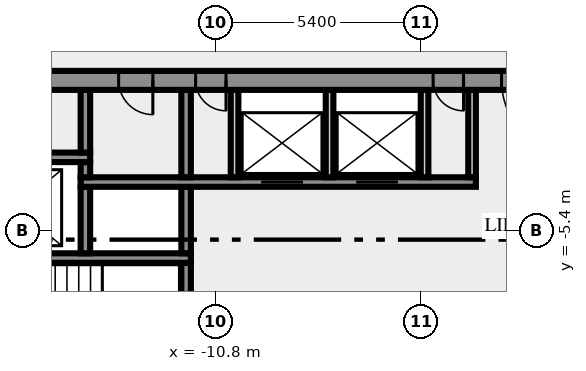
"""IFC4 building model, lengths in metres.
Left out: names, types, materials, properties, quantities, classifications, styles, units other than length and angle.
Written with IfcOpenShell. Run it as: python <this file> out.ifc"""

import sys

from ifc_helpers import new_model, si_unit, direction, frame, frame_2d, origin, place, context, subcontext, project, spatial, rectangle, extrude, element, fill, save


model = new_model("IFC4")
c1 = context("Model", 3, precision=1e-05, world=origin(), true_north=direction((0.0, 1.0)))
c2 = subcontext(c1, "Body", "Model", "MODEL_VIEW")
j1 = project(units=[si_unit("LENGTHUNIT", "METRE"), si_unit("PLANEANGLEUNIT", "RADIAN")], contexts=[c1])
p1 = place(None, origin())
s1 = spatial("IfcSite", under=j1, at=p1, CompositionType="ELEMENT")
p2 = place(p1, origin())
s2 = spatial("IfcBuilding", under=s1, at=p2, CompositionType="ELEMENT")
p3 = place(p2, frame((0.0, 0.0, 257.0)))
s3 = spatial("IfcBuildingStorey", under=s2, at=p3, CompositionType="ELEMENT", Elevation=257.0)
p4 = place(p3, frame((-11.575, -7.25, 0.0), z_axis=(0.0, 0.0, 1.0), x_axis=(0.0, 1.0, 0.0)))
e1 = element("IfcWall", 1, at=p4, inside=s3, PredefinedType="SHEAR", context=c2, shape_type="SweptSolid", body=[
    extrude(rectangle(XDim=1.0, YDim=0.25, at=frame_2d((0.5, 0.0))), origin(), (0.0, 0.0, 1.0), 3.65),
])
p5 = place(p3, frame((-11.45, -6.125, 0.0), z_axis=(0.0, 0.0, 1.0), x_axis=(-1.0, 0.0, 0.0)))
e2 = element("IfcWall", 2, at=p5, inside=s3, PredefinedType="SHEAR", context=c2, shape_type="SweptSolid", body=[
    extrude(rectangle(XDim=8.05, YDim=0.25, at=frame_2d((4.025, 0.0))), origin(), (0.0, 0.0, 1.0), 3.65),
])
p6 = place(p5, frame((6.2, 0.0, 0.0)))
e3 = element("IfcOpeningElement", 3, at=p6, cuts=e2, PredefinedType="OPENING", context=c2, shape_type="SweptSolid", body=[
    extrude(rectangle(XDim=1.8, YDim=2.1, at=frame_2d((0.9, 1.05))), frame((0.0, 0.135, 0.0), z_axis=(0.0, -1.0, 0.0), x_axis=(1.0, 0.0, 0.0)), (0.0, 0.0, 1.0), 0.27),
])
for number, where, z_axis, x_axis in (
    (4, (-14.225, -6.0, 0.0), (0.0, 0.0, 1.0), (0.0, 1.0, 0.0)),
    (5, (-11.575, -6.0, 0.0), (0.0, 0.0, 1.0), (0.0, 1.0, 0.0)),
):
    element("IfcWall", number, at=place(p3, frame(where, z_axis=z_axis, x_axis=x_axis)), inside=s3, PredefinedType="SHEAR", context=c2, shape_type="SweptSolid", body=[
        extrude(rectangle(XDim=1.75, YDim=0.25, at=frame_2d((0.875, 0.0))), origin(), (0.0, 0.0, 1.0), 3.65),
    ])
p7 = place(p3, frame((-14.35, -4.125, 0.0), z_axis=(0.0, 0.0, 1.0), x_axis=(1.0, 0.0, 0.0)))
e6 = element("IfcWall", 6, at=p7, inside=s3, PredefinedType="SHEAR", context=c2, shape_type="SweptSolid", body=[
    extrude(rectangle(XDim=10.4, YDim=0.25, at=frame_2d((5.2, 0.0))), origin(), (0.0, 0.0, 1.0), 3.65),
])
p8 = place(p7, frame((4.75, 0.0, 0.0)))
e7 = element("IfcOpeningElement", 7, at=p8, cuts=e6, PredefinedType="OPENING", context=c2, shape_type="SweptSolid", body=[
    extrude(rectangle(XDim=1.1, YDim=2.1, at=frame_2d((0.55, 1.05))), frame((0.0, 0.135, 0.0), z_axis=(0.0, -1.0, 0.0), x_axis=(1.0, 0.0, 0.0)), (0.0, 0.0, 1.0), 0.27),
])
p9 = place(p7, frame((7.25, 0.0, 0.0)))
e8 = element("IfcOpeningElement", 8, at=p9, cuts=e6, PredefinedType="OPENING", context=c2, shape_type="SweptSolid", body=[
    extrude(rectangle(XDim=1.1, YDim=2.1, at=frame_2d((0.55, 1.05))), frame((0.0, 0.135, 0.0), z_axis=(0.0, -1.0, 0.0), x_axis=(1.0, 0.0, 0.0)), (0.0, 0.0, 1.0), 0.27),
])
p10 = place(p3, frame((-14.225, -4.0, 0.0), z_axis=(0.0, 0.0, 1.0), x_axis=(0.0, 1.0, 0.0)))
e9 = element("IfcWall", 9, at=p10, inside=s3, PredefinedType="SHEAR", context=c2, shape_type="SweptSolid", body=[
    extrude(rectangle(XDim=0.4, YDim=0.25, at=frame_2d((0.2, 0.0))), origin(), (0.0, 0.0, 1.0), 3.65),
])
p11 = place(p3, frame((-11.575, -4.0, 0.0), z_axis=(0.0, 0.0, 1.0), x_axis=(0.0, 1.0, 0.0)))
e10 = element("IfcWall", 10, at=p11, inside=s3, PredefinedType="SHEAR", context=c2, shape_type="SweptSolid", body=[
    extrude(rectangle(XDim=2.3, YDim=0.25, at=frame_2d((1.15, 0.0))), origin(), (0.0, 0.0, 1.0), 3.65),
])
for number, where, z_axis, x_axis in (
    (11, (-10.3, -4.0, 0.0), (0.0, 0.0, 1.0), (0.0, 1.0, 0.0)),
    (12, (-7.8, -4.0, 0.0), (0.0, 0.0, 1.0), (0.0, 1.0, 0.0)),
    (13, (-5.3, -4.0, 0.0), (0.0, 0.0, 1.0), (0.0, 1.0, 0.0)),
    (14, (-4.05, -4.0, 0.0), (0.0, 0.0, 1.0), (0.0, 1.0, 0.0)),
):
    element("IfcWall", number, at=place(p3, frame(where, z_axis=z_axis, x_axis=x_axis)), inside=s3, PredefinedType="SOLIDWALL", context=c2, shape_type="SweptSolid", body=[
        extrude(rectangle(XDim=2.3, YDim=0.2, at=frame_2d((1.15, 0.0))), origin(), (0.0, 0.0, 1.0), 3.65),
    ])
p12 = place(p3, frame((-17.35, -3.475, 0.0), z_axis=(0.0, 0.0, 1.0), x_axis=(1.0, 0.0, 0.0)))
e15 = element("IfcWall", 15, at=p12, inside=s3, PredefinedType="SHEAR", context=c2, shape_type="SweptSolid", body=[
    extrude(rectangle(XDim=3.25, YDim=0.25, at=frame_2d((1.625, 0.0))), origin(), (0.0, 0.0, 1.0), 3.65),
])
p13 = place(p3, frame((-14.225, -3.35, 0.0), z_axis=(0.0, 0.0, 1.0), x_axis=(0.0, 1.0, 0.0)))
e16 = element("IfcWall", 16, at=p13, inside=s3, PredefinedType="SHEAR", context=c2, shape_type="SweptSolid", body=[
    extrude(rectangle(XDim=1.65, YDim=0.25, at=frame_2d((0.825, 0.0))), origin(), (0.0, 0.0, 1.0), 3.65),
])
p14 = place(p3, frame((20.49, -1.45, 0.0), z_axis=(0.0, 0.0, 1.0), x_axis=(-1.0, 0.0, 0.0)))
e17 = element("IfcWall", 17, at=p14, inside=s3, PredefinedType="SHEAR", context=c2, shape_type="SweptSolid", body=[
    extrude(rectangle(XDim=40.98, YDim=0.5, at=frame_2d((20.49, 0.0))), origin(), (0.0, 0.0, 1.0), 3.65),
])
p15 = place(p14, frame((38.14, 0.0, 0.0)))
e18 = element("IfcOpeningElement", 18, at=p15, cuts=e17, PredefinedType="OPENING", context=c2, shape_type="SweptSolid", body=[
    extrude(rectangle(XDim=1.8, YDim=2.1, at=frame_2d((0.9, 1.05))), frame((0.0, 0.26, 0.0), z_axis=(0.0, -1.0, 0.0), x_axis=(1.0, 0.0, 0.0)), (0.0, 0.0, 1.0), 0.52),
])
p16 = place(p14, frame((35.89, 0.0, 0.0)))
e19 = element("IfcOpeningElement", 19, at=p16, cuts=e17, PredefinedType="OPENING", context=c2, shape_type="SweptSolid", body=[
    extrude(rectangle(XDim=0.9, YDim=2.1, at=frame_2d((0.45, 1.05))), frame((0.0, 0.26, 0.0), z_axis=(0.0, -1.0, 0.0), x_axis=(1.0, 0.0, 0.0)), (0.0, 0.0, 1.0), 0.52),
])
p17 = place(p14, frame((32.94, 0.0, 0.0)))
e20 = element("IfcOpeningElement", 20, at=p17, cuts=e17, PredefinedType="OPENING", context=c2, shape_type="SweptSolid", body=[
    extrude(rectangle(XDim=0.9, YDim=2.1, at=frame_2d((0.45, 1.05))), frame((0.0, 0.26, 0.0), z_axis=(0.0, -1.0, 0.0), x_axis=(1.0, 0.0, 0.0)), (0.0, 0.0, 1.0), 0.52),
])
p18 = place(p14, frame((31.015, 0.0, 0.0)))
e21 = element("IfcOpeningElement", 21, at=p18, cuts=e17, PredefinedType="OPENING", context=c2, shape_type="SweptSolid", body=[
    extrude(rectangle(XDim=0.8, YDim=2.1, at=frame_2d((0.4, 1.05))), frame((0.0, 0.26, 0.0), z_axis=(0.0, -1.0, 0.0), x_axis=(1.0, 0.0, 0.0)), (0.0, 0.0, 1.0), 0.52),
])
p19 = place(p14, frame((24.765, 0.0, 0.0)))
e22 = element("IfcOpeningElement", 22, at=p19, cuts=e17, PredefinedType="OPENING", context=c2, shape_type="SweptSolid", body=[
    extrude(rectangle(XDim=0.8, YDim=2.1, at=frame_2d((0.4, 1.05))), frame((0.0, 0.26, 0.0), z_axis=(0.0, -1.0, 0.0), x_axis=(1.0, 0.0, 0.0)), (0.0, 0.0, 1.0), 0.52),
])
p20 = place(p14, frame((21.765, 0.0, 0.0)))
e23 = element("IfcOpeningElement", 23, at=p20, cuts=e17, PredefinedType="OPENING", context=c2, shape_type="SweptSolid", body=[
    extrude(rectangle(XDim=2.0, YDim=2.1, at=frame_2d((1.0, 1.05))), frame((0.0, 0.26, 0.0), z_axis=(0.0, -1.0, 0.0), x_axis=(1.0, 0.0, 0.0)), (0.0, 0.0, 1.0), 0.52),
])
p21 = place(p14, frame((14.202, 0.0, 0.0)))
e24 = element("IfcOpeningElement", 24, at=p21, cuts=e17, PredefinedType="OPENING", context=c2, shape_type="SweptSolid", body=[
    extrude(rectangle(XDim=0.9, YDim=2.1, at=frame_2d((0.45, 1.05))), frame((0.0, 0.26, 0.0), z_axis=(0.0, -1.0, 0.0), x_axis=(1.0, 0.0, 0.0)), (0.0, 0.0, 1.0), 0.52),
])
p22 = place(p14, frame((10.478, 0.0, 0.0)))
e25 = element("IfcOpeningElement", 25, at=p22, cuts=e17, PredefinedType="OPENING", context=c2, shape_type="SweptSolid", body=[
    extrude(rectangle(XDim=0.9, YDim=2.1, at=frame_2d((0.45, 1.05))), frame((0.0, 0.26, 0.0), z_axis=(0.0, -1.0, 0.0), x_axis=(1.0, 0.0, 0.0)), (0.0, 0.0, 1.0), 0.52),
])
p23 = place(p14, frame((7.14, 0.0, 0.0)))
e26 = element("IfcOpeningElement", 26, at=p23, cuts=e17, PredefinedType="OPENING", context=c2, shape_type="SweptSolid", body=[
    extrude(rectangle(XDim=0.9, YDim=2.1, at=frame_2d((0.45, 1.05))), frame((0.0, 0.26, 0.0), z_axis=(0.0, -1.0, 0.0), x_axis=(1.0, 0.0, 0.0)), (0.0, 0.0, 1.0), 0.52),
])
p24 = place(p14, frame((5.028, 0.0, 0.0)))
e27 = element("IfcOpeningElement", 27, at=p24, cuts=e17, PredefinedType="OPENING", context=c2, shape_type="SweptSolid", body=[
    extrude(rectangle(XDim=0.8, YDim=2.1, at=frame_2d((0.4, 1.05))), frame((0.0, 0.26, 0.0), z_axis=(0.0, -1.0, 0.0), x_axis=(1.0, 0.0, 0.0)), (0.0, 0.0, 1.0), 0.52),
])
p25 = place(p14, frame((3.452, 0.0, 0.0)))
e28 = element("IfcOpeningElement", 28, at=p25, cuts=e17, PredefinedType="OPENING", context=c2, shape_type="SweptSolid", body=[
    extrude(rectangle(XDim=0.8, YDim=2.1, at=frame_2d((0.4, 1.05))), frame((0.0, 0.26, 0.0), z_axis=(0.0, -1.0, 0.0), x_axis=(1.0, 0.0, 0.0)), (0.0, 0.0, 1.0), 0.52),
])
p26 = place(p14, frame((1.04, 0.0, 0.0)))
e29 = element("IfcOpeningElement", 29, at=p26, cuts=e17, PredefinedType="OPENING", context=c2, shape_type="SweptSolid", body=[
    extrude(rectangle(XDim=1.8, YDim=2.1, at=frame_2d((0.9, 1.05))), frame((0.0, 0.26, 0.0), z_axis=(0.0, -1.0, 0.0), x_axis=(1.0, 0.0, 0.0)), (0.0, 0.0, 1.0), 0.52),
])
p27 = place(p8, origin())
e30 = element("IfcDoor", 30, at=p27, inside=s3, OperationType="DOUBLE_DOOR_SLIDING", PredefinedType="DOOR", context=c2, shape_type="SweptSolid", body=[
    extrude(rectangle(XDim=1.1, YDim=2.1, at=frame_2d((0.55, 1.05))), frame((0.0, 0.025, 0.0), z_axis=(0.0, -1.0, 0.0), x_axis=(1.0, 0.0, 0.0)), (0.0, 0.0, 1.0), 0.05),
])
fill(e7, e30)
p28 = place(p9, origin())
e31 = element("IfcDoor", 31, at=p28, inside=s3, OperationType="DOUBLE_DOOR_SLIDING", PredefinedType="DOOR", context=c2, shape_type="SweptSolid", body=[
    extrude(rectangle(XDim=1.1, YDim=2.1, at=frame_2d((0.55, 1.05))), frame((0.0, 0.025, 0.0), z_axis=(0.0, -1.0, 0.0), x_axis=(1.0, 0.0, 0.0)), (0.0, 0.0, 1.0), 0.05),
])
fill(e8, e31)
p29 = place(p17, origin())
e32 = element("IfcDoor", 32, at=p29, inside=s3, OperationType="SINGLE_SWING_RIGHT", PredefinedType="DOOR", context=c2, shape_type="SweptSolid", body=[
    extrude(rectangle(XDim=0.9, YDim=2.1, at=frame_2d((0.45, 1.05))), frame((0.0, 0.025, 0.0), z_axis=(0.0, -1.0, 0.0), x_axis=(1.0, 0.0, 0.0)), (0.0, 0.0, 1.0), 0.05),
])
fill(e20, e32)
p30 = place(p18, origin())
e33 = element("IfcDoor", 33, at=p30, inside=s3, OperationType="SINGLE_SWING_RIGHT", PredefinedType="DOOR", context=c2, shape_type="SweptSolid", body=[
    extrude(rectangle(XDim=0.8, YDim=2.1, at=frame_2d((0.4, 1.05))), frame((0.0, 0.025, 0.0), z_axis=(0.0, -1.0, 0.0), x_axis=(1.0, 0.0, 0.0)), (0.0, 0.0, 1.0), 0.05),
])
fill(e21, e33)
p31 = place(p19, origin())
e34 = element("IfcDoor", 34, at=p31, inside=s3, OperationType="SINGLE_SWING_RIGHT", PredefinedType="DOOR", context=c2, shape_type="SweptSolid", body=[
    extrude(rectangle(XDim=0.8, YDim=2.1, at=frame_2d((0.4, 1.05))), frame((0.0, 0.025, 0.0), z_axis=(0.0, -1.0, 0.0), x_axis=(1.0, 0.0, 0.0)), (0.0, 0.0, 1.0), 0.05),
])
fill(e22, e34)
p32 = place(p20, origin())
e35 = element("IfcDoor", 35, at=p32, inside=s3, OperationType="DOUBLE_DOOR_SINGLE_SWING", PredefinedType="DOOR", context=c2, shape_type="SweptSolid", body=[
    extrude(rectangle(XDim=2.0, YDim=2.1, at=frame_2d((1.0, 1.05))), frame((0.0, 0.025, 0.0), z_axis=(0.0, -1.0, 0.0), x_axis=(1.0, 0.0, 0.0)), (0.0, 0.0, 1.0), 0.05),
])
fill(e23, e35)
save(model, sys.argv[1])
